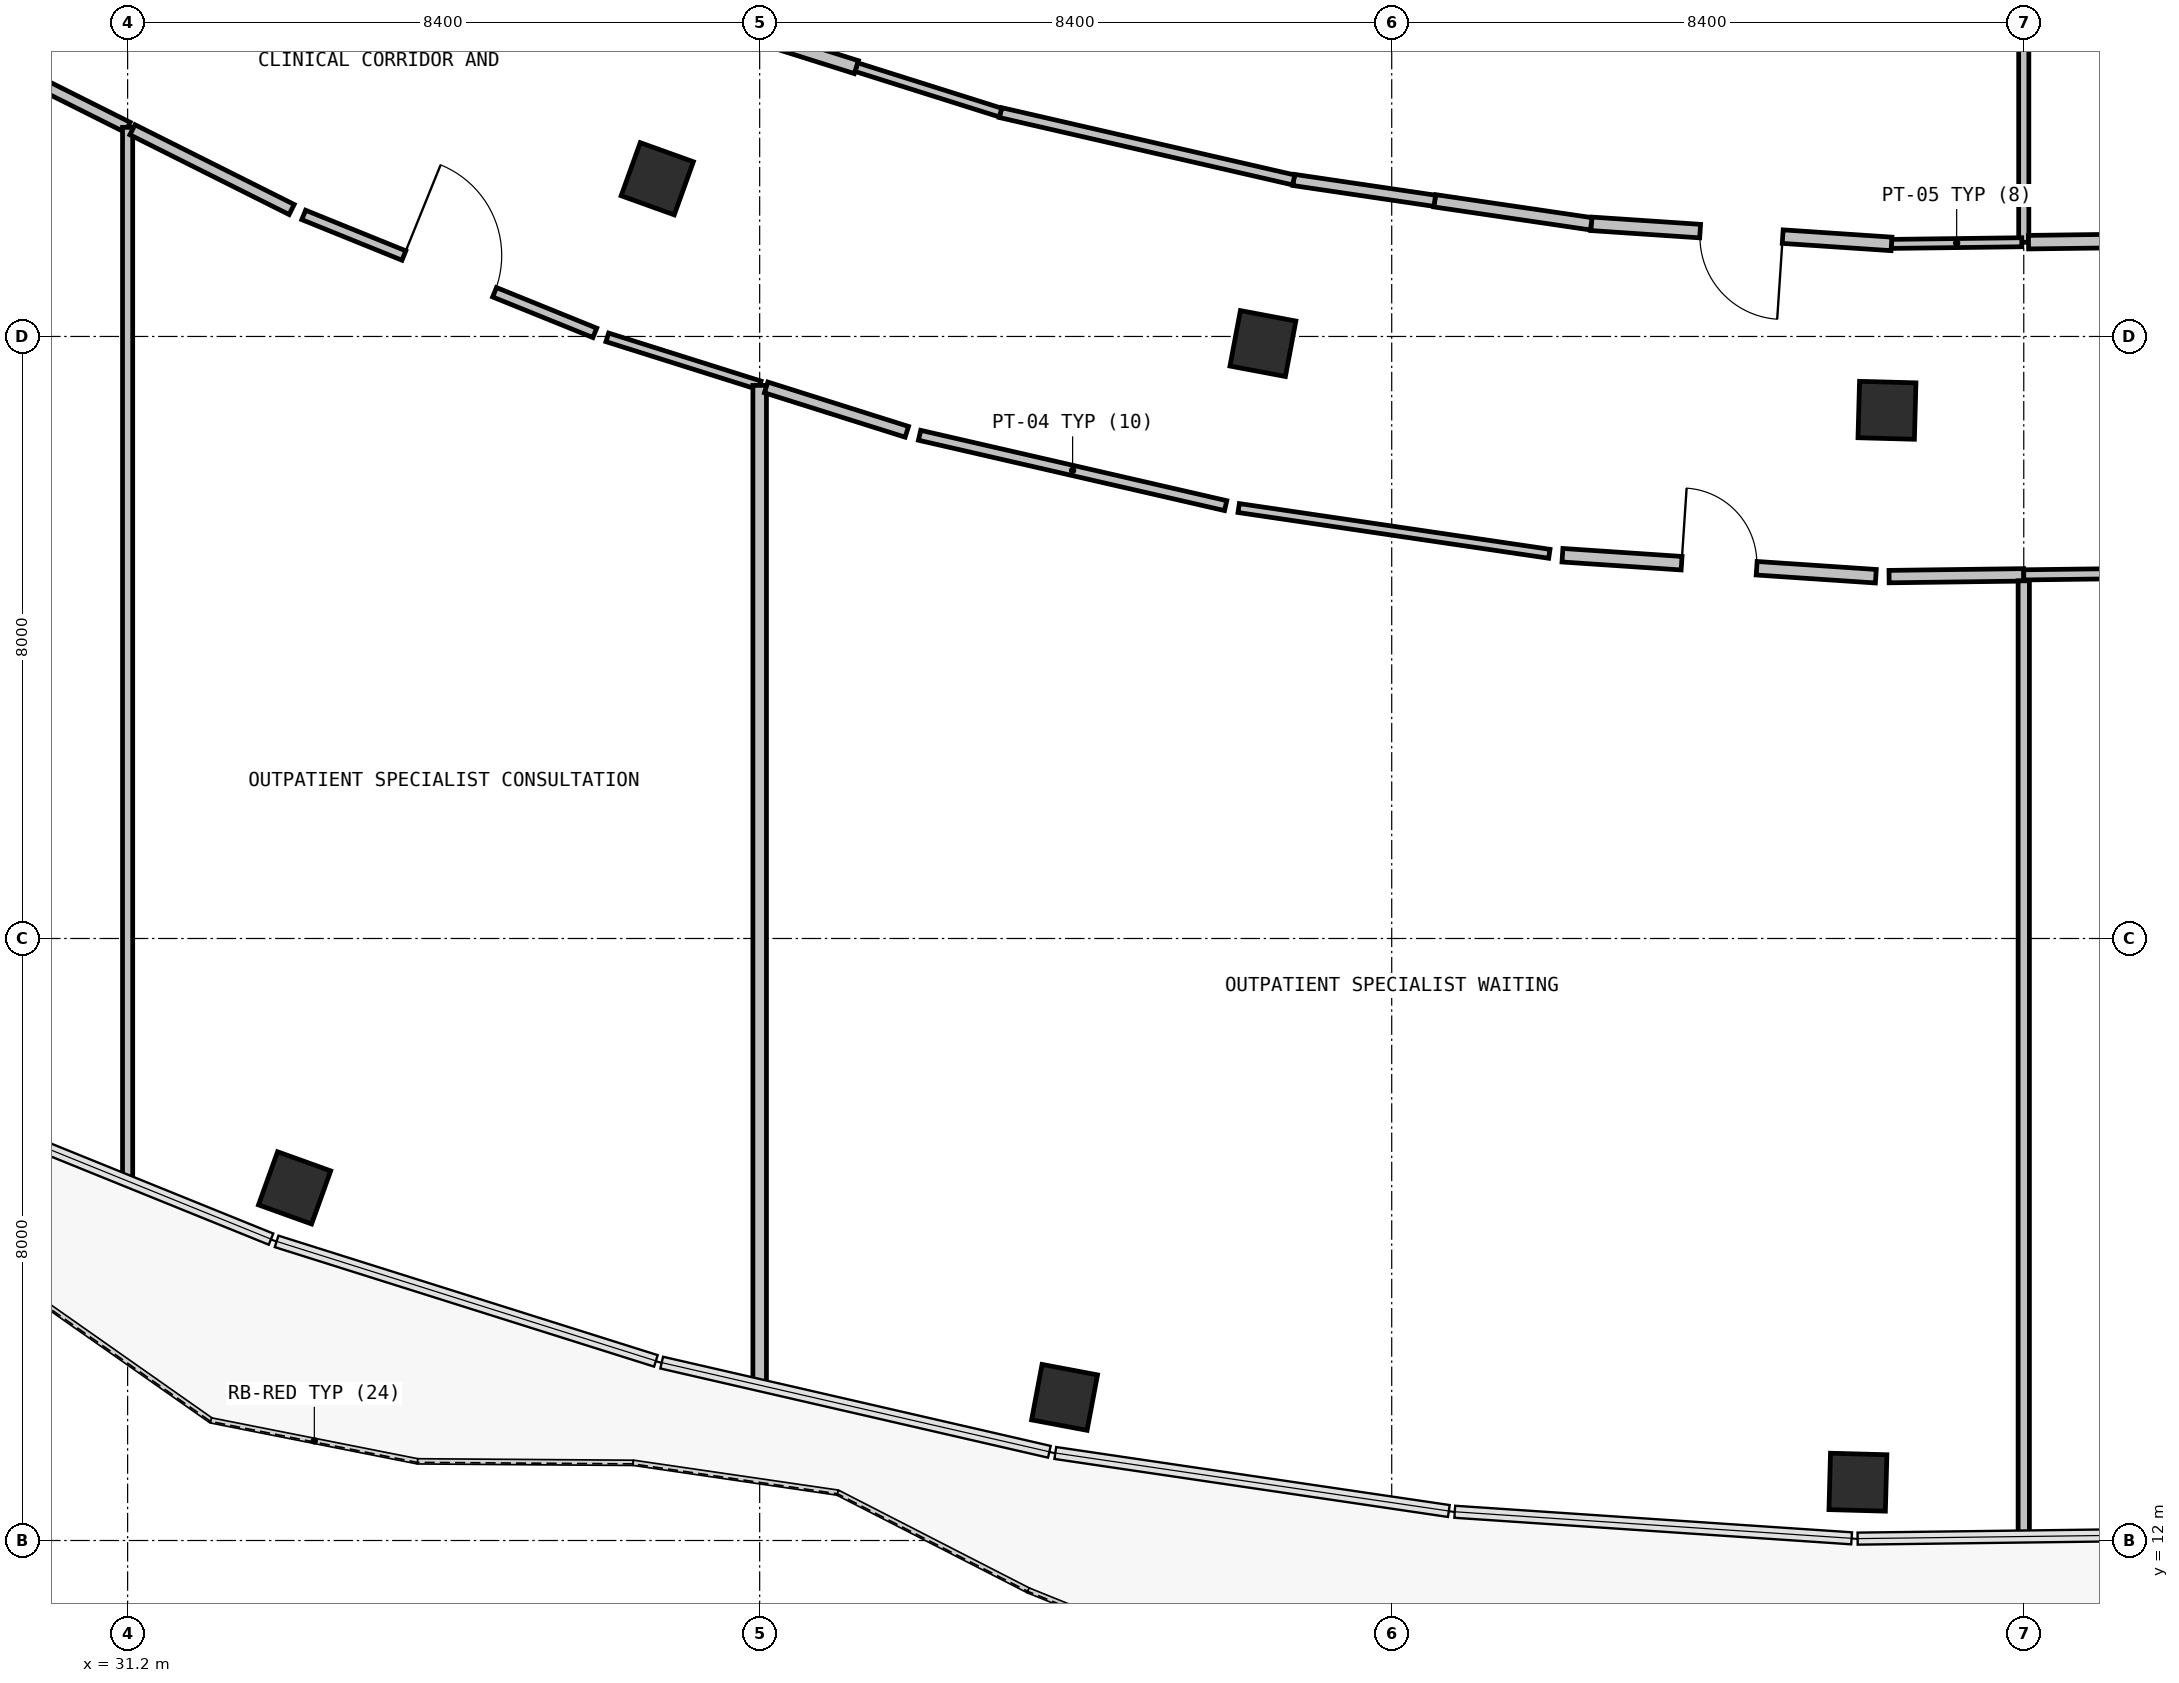
"""IFC4 building model, lengths in metres.
Left out: names, types, materials, properties, quantities, classifications, styles, units other than length and angle.
Written with IfcOpenShell. Run it as: python <this file> out.ifc"""

import sys

from ifc_helpers import new_model, si_unit, direction, frame, frame_2d, origin, origin_2d, place, context, subcontext, project, spatial, rectangle, extrude, element, fill, save


model = new_model("IFC4")
c1 = context("Model", 3, precision=1e-05, world=origin(), true_north=direction((0.0, 1.0)))
c2 = subcontext(c1, "Body", "Model", "MODEL_VIEW")
j1 = project(units=[si_unit("LENGTHUNIT", "METRE"), si_unit("PLANEANGLEUNIT", "RADIAN")], contexts=[c1])
p1 = place(None, origin())
s1 = spatial("IfcSite", under=j1, at=p1, CompositionType="ELEMENT")
p2 = place(p1, origin())
s2 = spatial("IfcBuilding", under=s1, at=p2, CompositionType="ELEMENT")
p3 = place(p2, origin())
s3 = spatial("IfcBuildingStorey", under=s2, at=p3, CompositionType="ELEMENT", Elevation=0.0)
for number, where, z_axis, x_axis in (
    (1, (38.239, 30.096, 0.0), (0.0, 0.0, 1.0), (0.338, 0.941, 0.0)),
    (2, (33.419, 16.686, 0.0), (0.0, 0.0, 1.0), (0.338, 0.941, 0.0)),
    (3, (46.288, 27.906, 0.0), (0.0, 0.0, 1.0), (0.185, 0.983, 0.0)),
    (4, (43.652, 13.902, 0.0), (0.0, 0.0, 1.0), (0.185, 0.983, 0.0)),
    (5, (54.582, 27.019, 0.0), (0.0, 0.0, 1.0), (0.027, 1.0, 0.0)),
    (6, (54.196, 12.775, 0.0), (0.0, 0.0, 1.0), (0.027, 1.0, 0.0)),
):
    element("IfcColumn", number, at=place(p3, frame(where, z_axis=z_axis, x_axis=x_axis)), inside=s3, PredefinedType="COLUMN", context=c2, shape_type="SweptSolid", body=[
        extrude(rectangle(XDim=0.75, YDim=0.75, at=origin_2d()), origin(), (0.0, 0.0, 1.0), 5.4),
    ])
p4 = place(p3, frame((29.648, 31.556, 0.0), z_axis=(0.0, 0.0, 1.0), x_axis=(0.894230168264, -0.447607424165, 0.0)))
e7 = element("IfcWall", 7, at=p4, inside=s3, PredefinedType="PARTITIONING", context=c2, shape_type="SweptSolid", body=[
    extrude(rectangle(XDim=1.736, YDim=0.15, at=frame_2d((0.868, 0.0))), origin(), (0.0, 0.0, 1.0), 5.08),
])
p5 = place(p3, frame((31.2, 30.779, 0.0), z_axis=(0.0, 0.0, 1.0), x_axis=(0.0, -1.0, 0.0)))
e8 = element("IfcWall", 8, at=p5, inside=s3, PredefinedType="PARTITIONING", context=c2, shape_type="SweptSolid", body=[
    extrude(rectangle(XDim=13.99, YDim=0.135, at=frame_2d((6.995, 0.0))), origin(), (0.0, 0.0, 1.0), 5.08),
])
p6 = place(p3, frame((31.264, 30.747, 0.0), z_axis=(0.0, 0.0, 1.0), x_axis=(0.894076176451, -0.447914936905, 0.0)))
e9 = element("IfcWall", 9, at=p6, inside=s3, PredefinedType="PARTITIONING", context=c2, shape_type="SweptSolid", body=[
    extrude(rectangle(XDim=2.367, YDim=0.15, at=frame_2d((1.183, 0.0))), origin(), (0.0, 0.0, 1.0), 5.08),
])
p7 = place(p3, frame((33.54, 29.615, 0.0), z_axis=(0.0, 0.0, 1.0), x_axis=(0.926870756001, -0.375380609075, 0.0)))
e10 = element("IfcWall", 10, at=p7, inside=s3, PredefinedType="PARTITIONING", context=c2, shape_type="SweptSolid", body=[
    extrude(rectangle(XDim=4.174, YDim=0.135, at=frame_2d((2.087, 0.0))), origin(), (0.0, 0.0, 1.0), 5.08),
])
p8 = place(p7, frame((1.437, 0.0, 0.0)))
e11 = element("IfcOpeningElement", 11, at=p8, cuts=e10, PredefinedType="OPENING", context=c2, shape_type="SweptSolid", body=[
    extrude(rectangle(XDim=1.3, YDim=2.15, at=frame_2d((0.65, 1.075))), frame((0.0, 0.077, 0.0), z_axis=(0.0, -1.0, 0.0), x_axis=(1.0, 0.0, 0.0)), (0.0, 0.0, 1.0), 0.155),
])
p9 = place(p3, frame((37.575, 27.988, 0.0), z_axis=(0.0, 0.0, 1.0), x_axis=(0.953796174372, -0.300454418762, 0.0)))
e12 = element("IfcWall", 12, at=p9, inside=s3, PredefinedType="PARTITIONING", context=c2, shape_type="SweptSolid", body=[
    extrude(rectangle(XDim=2.123, YDim=0.12, at=frame_2d((1.062, 0.0))), origin(), (0.0, 0.0, 1.0), 5.08),
])
p10 = place(p3, frame((39.6, 27.35, 0.0), z_axis=(0.0, 0.0, 1.0), x_axis=(0.0, -1.0, 0.0)))
e13 = element("IfcWall", 13, at=p10, inside=s3, PredefinedType="PARTITIONING", context=c2, shape_type="SweptSolid", body=[
    extrude(rectangle(XDim=13.274, YDim=0.18, at=frame_2d((6.637, 0.0))), origin(), (0.0, 0.0, 1.0), 5.08),
])
p11 = place(p3, frame((39.686, 27.323, 0.0), z_axis=(0.0, 0.0, 1.0), x_axis=(0.953640983057, -0.300946632204, 0.0)))
e14 = element("IfcWall", 14, at=p11, inside=s3, PredefinedType="PARTITIONING", context=c2, shape_type="SweptSolid", body=[
    extrude(rectangle(XDim=1.961, YDim=0.15, at=frame_2d((0.98, 0.0))), origin(), (0.0, 0.0, 1.0), 5.08),
])
p12 = place(p3, frame((41.725, 26.687, 0.0), z_axis=(0.0, 0.0, 1.0), x_axis=(0.974584054813, -0.224022141996, 0.0)))
e15 = element("IfcWall", 15, at=p12, inside=s3, PredefinedType="PARTITIONING", context=c2, shape_type="SweptSolid", body=[
    extrude(rectangle(XDim=4.174, YDim=0.135, at=frame_2d((2.087, 0.0))), origin(), (0.0, 0.0, 1.0), 5.08),
])
p13 = place(p3, frame((45.966, 25.72, 0.0), z_axis=(0.0, 0.0, 1.0), x_axis=(0.989334354326, -0.145662401979, 0.0)))
e16 = element("IfcWall", 16, at=p13, inside=s3, PredefinedType="PARTITIONING", context=c2, shape_type="SweptSolid", body=[
    extrude(rectangle(XDim=4.173, YDim=0.12, at=frame_2d((2.087, 0.0))), origin(), (0.0, 0.0, 1.0), 5.08),
])
p14 = place(p3, frame((50.269, 25.093, 0.0), z_axis=(0.0, 0.0, 1.0), x_axis=(0.997763106532, -0.066848958427, 0.0)))
e17 = element("IfcWall", 17, at=p14, inside=s3, PredefinedType="PARTITIONING", context=c2, shape_type="SweptSolid", body=[
    extrude(rectangle(XDim=4.174, YDim=0.18, at=frame_2d((2.087, 0.0))), origin(), (0.0, 0.0, 1.0), 5.08),
])
p15 = place(p14, frame((1.587, 0.0, 0.0)))
e18 = element("IfcOpeningElement", 18, at=p15, cuts=e17, PredefinedType="OPENING", context=c2, shape_type="SweptSolid", body=[
    extrude(rectangle(XDim=1.0, YDim=2.15, at=frame_2d((0.5, 1.075))), frame((0.0, 0.1, 0.0), z_axis=(0.0, -1.0, 0.0), x_axis=(1.0, 0.0, 0.0)), (0.0, 0.0, 1.0), 0.2),
])
p16 = place(p3, frame((54.61, 24.809, 0.0), z_axis=(0.0, 0.0, 1.0), x_axis=(0.999917804939, 0.012821207702, 0.0)))
e19 = element("IfcWall", 19, at=p16, inside=s3, PredefinedType="PARTITIONING", context=c2, shape_type="SweptSolid", body=[
    extrude(rectangle(XDim=1.79, YDim=0.165, at=frame_2d((0.895, 0.0))), origin(), (0.0, 0.0, 1.0), 5.08),
])
p17 = place(p3, frame((56.4, 24.753, 0.0), z_axis=(0.0, 0.0, 1.0), x_axis=(0.0, -1.0, 0.0)))
e20 = element("IfcWall", 20, at=p17, inside=s3, PredefinedType="PARTITIONING", context=c2, shape_type="SweptSolid", body=[
    extrude(rectangle(XDim=12.689, YDim=0.15, at=frame_2d((6.344, 0.0))), origin(), (0.0, 0.0, 1.0), 5.08),
])
p18 = place(p3, frame((56.4, 42.02, 0.0), z_axis=(0.0, 0.0, 1.0), x_axis=(0.0, -1.0, 0.0)))
e21 = element("IfcWall", 21, at=p18, inside=s3, PredefinedType="PARTITIONING", context=c2, shape_type="SweptSolid", body=[
    extrude(rectangle(XDim=12.768, YDim=0.135, at=frame_2d((6.384, 0.0))), origin(), (0.0, 0.0, 1.0), 5.08),
])
p19 = place(p3, frame((56.374, 29.252, 0.0), z_axis=(0.0, 0.0, 1.0), x_axis=(-0.999919532551, -0.012685756686, 0.0)))
e22 = element("IfcWall", 22, at=p19, inside=s3, PredefinedType="PARTITIONING", context=c2, shape_type="SweptSolid", body=[
    extrude(rectangle(XDim=1.732, YDim=0.12, at=frame_2d((0.866, 0.0))), origin(), (0.0, 0.0, 1.0), 5.08),
])
p20 = place(p3, frame((54.642, 29.23, 0.0), z_axis=(0.0, 0.0, 1.0), x_axis=(-0.99776702154, 0.06679049878, 0.0)))
e23 = element("IfcWall", 23, at=p20, inside=s3, PredefinedType="PARTITIONING", context=c2, shape_type="SweptSolid", body=[
    extrude(rectangle(XDim=3.999, YDim=0.18, at=frame_2d((2.0, 0.0))), origin(), (0.0, 0.0, 1.0), 5.08),
])
p21 = place(p20, frame((1.449, 0.0, 0.0)))
e24 = element("IfcOpeningElement", 24, at=p21, cuts=e23, PredefinedType="OPENING", context=c2, shape_type="SweptSolid", body=[
    extrude(rectangle(XDim=1.1, YDim=2.15, at=frame_2d((0.55, 1.075))), frame((0.0, 0.1, 0.0), z_axis=(0.0, -1.0, 0.0), x_axis=(1.0, 0.0, 0.0)), (0.0, 0.0, 1.0), 0.2),
])
p22 = place(p3, frame((50.652, 29.497, 0.0), z_axis=(0.0, 0.0, 1.0), x_axis=(-0.989358152092, 0.145500676593, 0.0)))
e25 = element("IfcWall", 25, at=p22, inside=s3, PredefinedType="PARTITIONING", context=c2, shape_type="SweptSolid", body=[
    extrude(rectangle(XDim=2.103, YDim=0.165, at=frame_2d((1.051, 0.0))), origin(), (0.0, 0.0, 1.0), 5.08),
])
p23 = place(p3, frame((48.572, 29.803, 0.0), z_axis=(0.0, 0.0, 1.0), x_axis=(-0.989255269902, 0.146198532726, 0.0)))
e26 = element("IfcWall", 26, at=p23, inside=s3, PredefinedType="PARTITIONING", context=c2, shape_type="SweptSolid", body=[
    extrude(rectangle(XDim=1.895, YDim=0.15, at=frame_2d((0.948, 0.0))), origin(), (0.0, 0.0, 1.0), 5.08),
])
p24 = place(p3, frame((46.697, 30.08, 0.0), z_axis=(0.0, 0.0, 1.0), x_axis=(-0.974613054852, 0.223895943044, 0.0)))
e27 = element("IfcWall", 27, at=p24, inside=s3, PredefinedType="PARTITIONING", context=c2, shape_type="SweptSolid", body=[
    extrude(rectangle(XDim=3.998, YDim=0.135, at=frame_2d((1.999, 0.0))), origin(), (0.0, 0.0, 1.0), 5.08),
])
p25 = place(p3, frame((42.801, 30.975, 0.0), z_axis=(0.0, 0.0, 1.0), x_axis=(-0.953733151944, 0.300654411049, 0.0)))
e28 = element("IfcWall", 28, at=p25, inside=s3, PredefinedType="PARTITIONING", context=c2, shape_type="SweptSolid", body=[
    extrude(rectangle(XDim=2.009, YDim=0.12, at=frame_2d((1.004, 0.0))), origin(), (0.0, 0.0, 1.0), 5.08),
])
p26 = place(p3, frame((40.885, 31.579, 0.0), z_axis=(0.0, 0.0, 1.0), x_axis=(-0.953790595737, 0.300472127633, 0.0)))
e29 = element("IfcWall", 29, at=p26, inside=s3, PredefinedType="PARTITIONING", context=c2, shape_type="SweptSolid", body=[
    extrude(rectangle(XDim=1.347, YDim=0.18, at=frame_2d((0.674, 0.0))), origin(), (0.0, 0.0, 1.0), 5.08),
])
p27 = place(p3, frame((56.4, 24.832, 0.0), z_axis=(0.0, 0.0, 1.0), x_axis=(0.999920614738, 0.012600167566, 0.0)))
e30 = element("IfcWall", 30, at=p27, inside=s3, PredefinedType="PARTITIONING", context=c2, shape_type="SweptSolid", body=[
    extrude(rectangle(XDim=2.383, YDim=0.135, at=frame_2d((1.192, 0.0))), origin(), (0.0, 0.0, 1.0), 5.08),
])
p28 = place(p3, frame((58.639, 29.281, 0.0), z_axis=(0.0, 0.0, 1.0), x_axis=(-0.999916773113, -0.012901428128, 0.0)))
e31 = element("IfcWall", 31, at=p28, inside=s3, PredefinedType="PARTITIONING", context=c2, shape_type="SweptSolid", body=[
    extrude(rectangle(XDim=2.176, YDim=0.18, at=frame_2d((1.088, 0.0))), origin(), (0.0, 0.0, 1.0), 5.08),
])
p29 = place(p8, origin())
e32 = element("IfcDoor", 32, at=p29, inside=s3, OperationType="SINGLE_SWING_RIGHT", PredefinedType="DOOR", context=c2, shape_type="SweptSolid", body=[
    extrude(rectangle(XDim=1.3, YDim=2.15, at=frame_2d((0.65, 1.075))), frame((0.0, 0.025, 0.0), z_axis=(0.0, -1.0, 0.0), x_axis=(1.0, 0.0, 0.0)), (0.0, 0.0, 1.0), 0.05),
])
fill(e11, e32)
p30 = place(p15, origin())
e33 = element("IfcDoor", 33, at=p30, inside=s3, OperationType="SINGLE_SWING_RIGHT", PredefinedType="DOOR", context=c2, shape_type="SweptSolid", body=[
    extrude(rectangle(XDim=1.0, YDim=2.15, at=frame_2d((0.5, 1.075))), frame((0.0, 0.025, 0.0), z_axis=(0.0, -1.0, 0.0), x_axis=(1.0, 0.0, 0.0)), (0.0, 0.0, 1.0), 0.05),
])
fill(e18, e33)
p31 = place(p21, origin())
e34 = element("IfcDoor", 34, at=p31, inside=s3, OperationType="SINGLE_SWING_LEFT", PredefinedType="DOOR", context=c2, shape_type="SweptSolid", body=[
    extrude(rectangle(XDim=1.1, YDim=2.15, at=frame_2d((0.55, 1.075))), frame((0.0, 0.025, 0.0), z_axis=(0.0, -1.0, 0.0), x_axis=(1.0, 0.0, 0.0)), (0.0, 0.0, 1.0), 0.05),
])
fill(e24, e34)
save(model, sys.argv[1])
